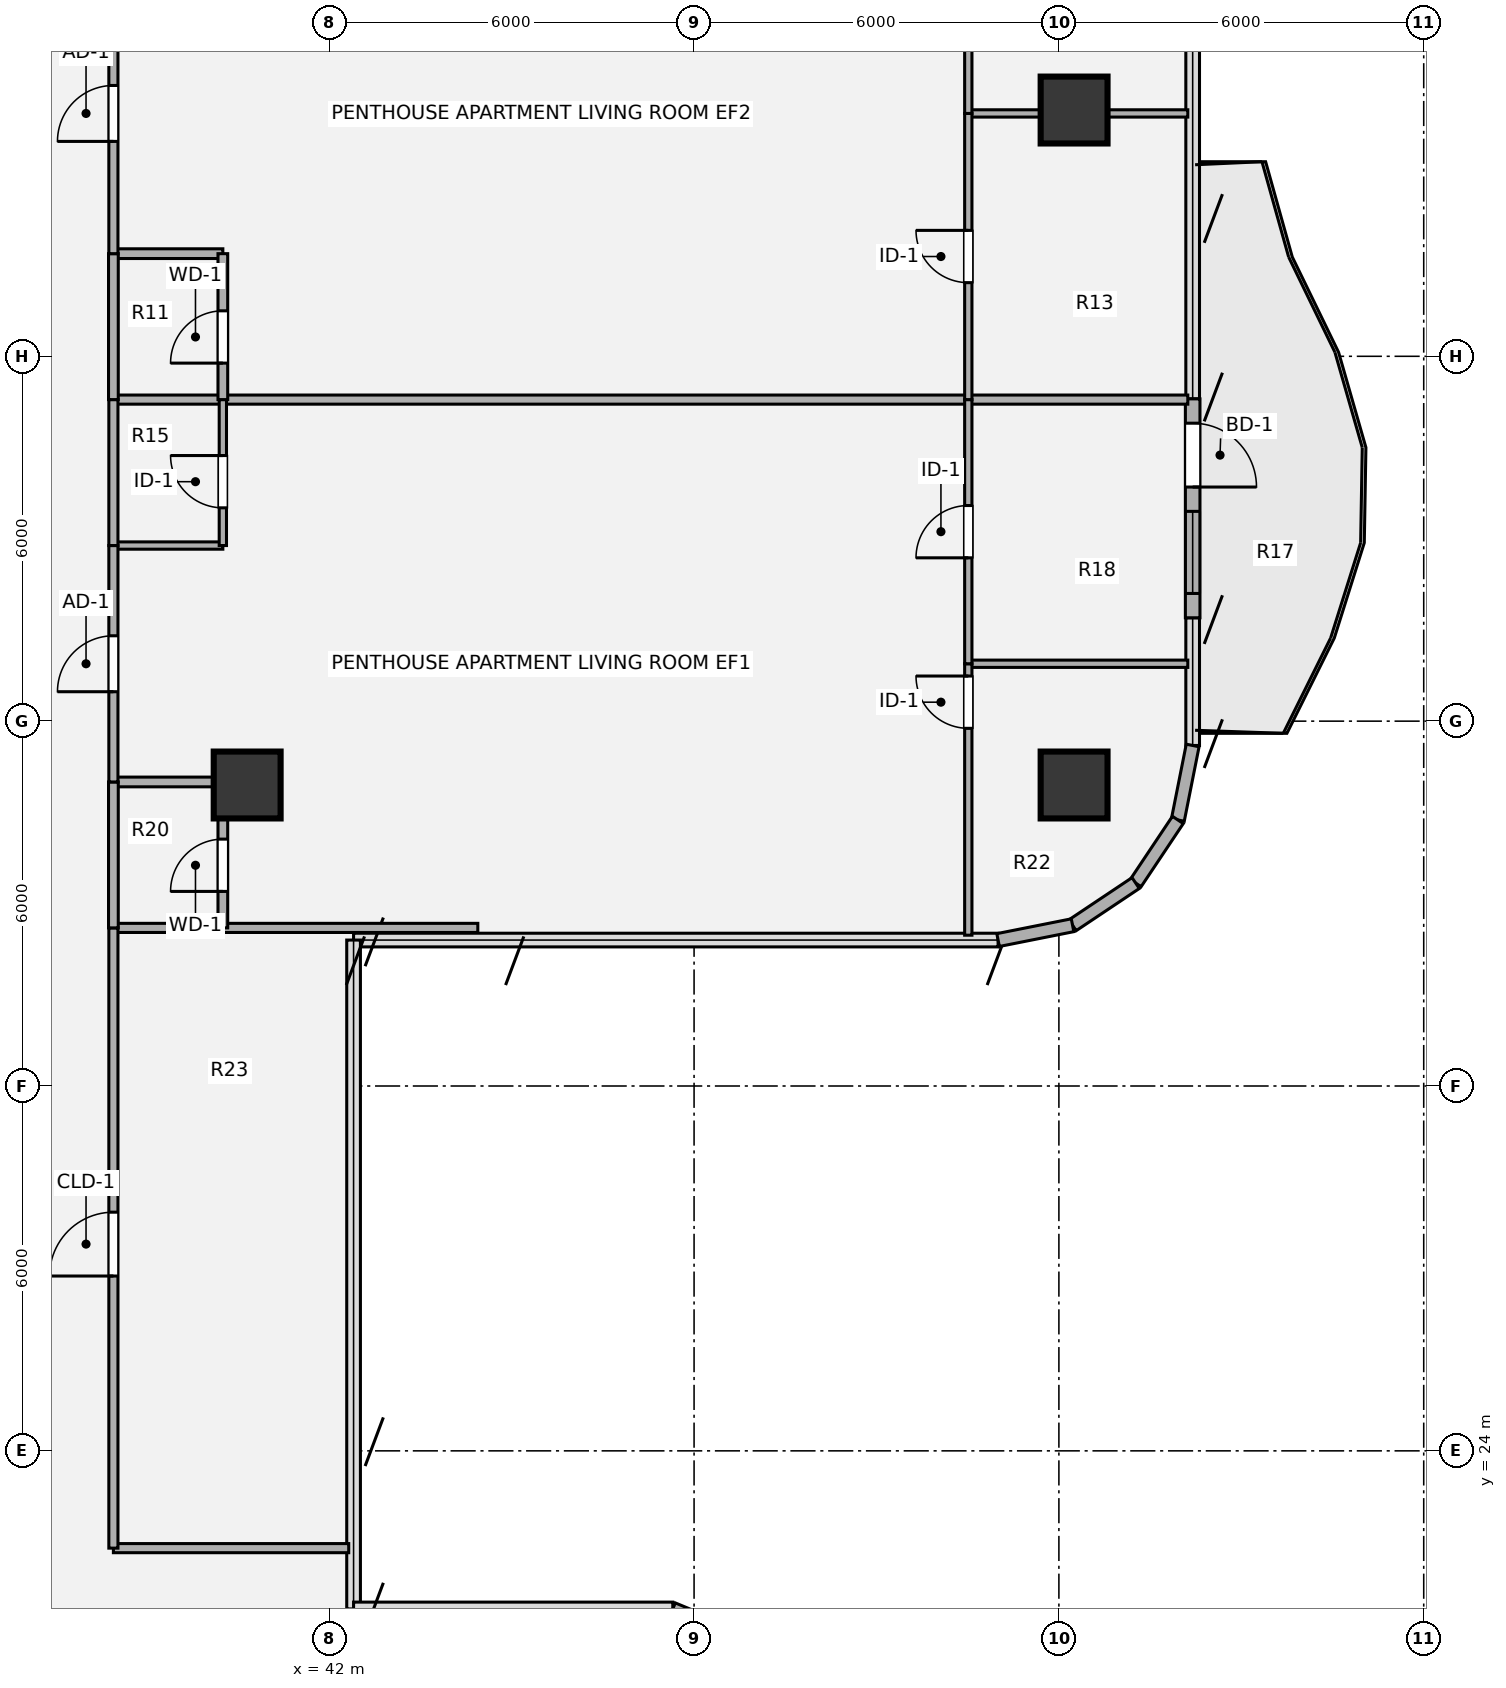
"""IFC4 building model, lengths in metres.
Left out: names, types, materials, properties, quantities, classifications, styles, units other than length and angle.
Written with IfcOpenShell. Run it as: python <this file> out.ifc"""

import sys

from ifc_helpers import new_model, si_unit, direction, frame, frame_2d, origin, origin_2d, place, context, subcontext, project, spatial, rectangle, hollow_circle, extrude, source, transform, mapped, element, fill, save


model = new_model("IFC4")
c1 = context("Model", 3, precision=1e-05, world=origin(), true_north=direction((0.0, 1.0)))
c2 = subcontext(c1, "Body", "Model", "MODEL_VIEW")
j1 = project(units=[si_unit("LENGTHUNIT", "METRE"), si_unit("PLANEANGLEUNIT", "RADIAN")], contexts=[c1])
p1 = place(None, origin())
s1 = spatial("IfcSite", under=j1, at=p1, CompositionType="ELEMENT")
p2 = place(p1, origin())
s2 = spatial("IfcBuilding", under=s1, at=p2, CompositionType="ELEMENT")
p3 = place(p2, frame((0.0, 0.0, 156.42)))
s3 = spatial("IfcBuildingStorey", under=s2, at=p3, CompositionType="ELEMENT", Elevation=156.42)
m1 = source(origin(), c2, "Body", "SweptSolid", [
    extrude(hollow_circle(Radius=0.55, WallThickness=0.04, at=origin_2d()), origin(), (0.0, 0.0, 1.0), 3.78),
])
for number, where, z_axis, x_axis in (
    (1, (54.25, 34.95, 0.0), (0.0, 0.0, 1.0), (1.0, 0.0, 0.0)),
    (2, (54.25, 46.05, 0.0), (0.0, 0.0, 1.0), (1.0, 0.0, 0.0)),
    (3, (40.65, 34.95, 0.0), (0.0, 0.0, 1.0), (1.0, 0.0, 0.0)),
):
    element("IfcColumn", number, at=place(p3, frame(where, z_axis=z_axis, x_axis=x_axis)), inside=s3, PredefinedType="COLUMN", context=c2, shape_type="MappedRepresentation", body=[
        mapped(m1, transform((0.0, 0.0, 0.0), x_axis=(1.0, 0.0, 0.0), y_axis=(0.0, 1.0, 0.0), z_axis=(0.0, 0.0, 1.0), scale=1.0)),
    ])
p4 = place(p3, frame((56.2, 41.3, 0.0), z_axis=(0.0, 0.0, 1.0), x_axis=(0.0, -1.0, 0.0)))
e4 = element("IfcWall", 4, at=p4, inside=s3, PredefinedType="SOLIDWALL", context=c2, shape_type="SweptSolid", body=[
    extrude(rectangle(XDim=3.6, YDim=0.24, at=frame_2d((1.8, 0.0))), origin(), (0.0, 0.0, 1.0), 3.53),
])
p5 = place(p4, frame((0.4, 0.0, 0.0)))
e5 = element("IfcOpeningElement", 5, at=p5, cuts=e4, PredefinedType="OPENING", context=c2, shape_type="SweptSolid", body=[
    extrude(rectangle(XDim=1.05, YDim=2.15, at=origin_2d()), frame((0.525, 0.13, 1.075), z_axis=(0.0, -1.0, 0.0), x_axis=(1.0, 0.0, 0.0)), (0.0, 0.0, 1.0), 0.26),
])
p6 = place(p4, frame((1.85, 0.0, 0.85)))
e6 = element("IfcOpeningElement", 6, at=p6, cuts=e4, PredefinedType="OPENING", context=c2, shape_type="SweptSolid", body=[
    extrude(rectangle(XDim=1.35, YDim=1.35, at=origin_2d()), frame((0.675, 0.13, 0.675), z_axis=(0.0, -1.0, 0.0), x_axis=(1.0, 0.0, 0.0)), (0.0, 0.0, 1.0), 0.26),
])
for number, where, z_axis, x_axis in (
    (7, (56.2, 35.6, 0.0), (0.0, 0.0, 1.0), (-0.195, -0.981, 0.0)),
    (8, (55.956, 34.375, 0.0), (0.0, 0.0, 1.0), (-0.556, -0.831, 0.0)),
    (9, (55.263, 33.337, 0.0), (0.0, 0.0, 1.0), (-0.831, -0.556, 0.0)),
    (10, (54.225, 32.644, 0.0), (0.0, 0.0, 1.0), (-0.981, -0.195, 0.0)),
):
    element("IfcWall", number, at=place(p3, frame(where, z_axis=z_axis, x_axis=x_axis)), inside=s3, PredefinedType="SOLIDWALL", context=c2, shape_type="SweptSolid", body=[
        extrude(rectangle(XDim=1.249, YDim=0.215, at=frame_2d((0.624, 0.0))), origin(), (0.0, 0.0, 1.0), 3.53),
    ])
p7 = place(p3, frame((47.65, 21.4, 0.0), z_axis=(0.0, 0.0, 1.0), x_axis=(0.924205486139, -0.381895560841, 0.0)))
e11 = element("IfcWall", 11, at=p7, inside=s3, PredefinedType="SOLIDWALL", context=c2, shape_type="SweptSolid", body=[
    extrude(rectangle(XDim=0.268, YDim=0.215, at=frame_2d((0.134, 0.0))), origin(), (0.0, 0.0, 1.0), 3.53),
])
p8 = place(p3, frame((38.45, 22.4, 0.0), z_axis=(0.0, 0.0, 1.0), x_axis=(1.0, 0.0, 0.0)))
e12 = element("IfcWall", 12, at=p8, inside=s3, PredefinedType="PARTITIONING", context=c2, shape_type="SweptSolid", body=[
    extrude(rectangle(XDim=3.87, YDim=0.15, at=frame_2d((1.935, 0.0))), origin(), (0.0, 0.0, 1.0), 3.5),
])
p9 = place(p3, frame((38.45, 32.6, 0.0), z_axis=(0.0, 0.0, 1.0), x_axis=(1.0, 0.0, 0.0)))
e13 = element("IfcWall", 13, at=p9, inside=s3, PredefinedType="PARTITIONING", context=c2, shape_type="SweptSolid", body=[
    extrude(rectangle(XDim=5.993, YDim=0.15, at=frame_2d((2.997, 0.0))), origin(), (0.0, 0.0, 1.0), 3.5),
])
p10 = place(p3, frame((38.45, 35.0, 0.0), z_axis=(0.0, 0.0, 1.0), x_axis=(1.0, 0.0, 0.0)))
e14 = element("IfcWall", 14, at=p10, inside=s3, PredefinedType="PLUMBINGWALL", context=c2, shape_type="SweptSolid", body=[
    extrude(rectangle(XDim=1.8, YDim=0.16, at=frame_2d((0.9, 0.0))), origin(), (0.0, 0.0, 1.0), 2.903),
])
p11 = place(p3, frame((52.51, 36.944, 0.0), z_axis=(0.0, 0.0, 1.0), x_axis=(1.0, 0.0, 0.0)))
e15 = element("IfcWall", 15, at=p11, inside=s3, PredefinedType="PARTITIONING", context=c2, shape_type="SweptSolid", body=[
    extrude(rectangle(XDim=3.61, YDim=0.12, at=frame_2d((1.805, 0.0))), origin(), (0.0, 0.0, 1.0), 2.982),
])
p12 = place(p3, frame((38.45, 38.888, 0.0), z_axis=(0.0, 0.0, 1.0), x_axis=(1.0, 0.0, 0.0)))
e16 = element("IfcWall", 16, at=p12, inside=s3, PredefinedType="PARTITIONING", context=c2, shape_type="SweptSolid", body=[
    extrude(rectangle(XDim=1.8, YDim=0.12, at=frame_2d((0.9, 0.0))), origin(), (0.0, 0.0, 1.0), 3.259),
])
p13 = place(p3, frame((38.45, 41.288, 0.0), z_axis=(0.0, 0.0, 1.0), x_axis=(1.0, 0.0, 0.0)))
e17 = element("IfcWall", 17, at=p13, inside=s3, PredefinedType="PARTITIONING", context=c2, shape_type="SweptSolid", body=[
    extrude(rectangle(XDim=17.67, YDim=0.15, at=frame_2d((8.835, 0.0))), origin(), (0.0, 0.0, 1.0), 2.982),
])
p14 = place(p3, frame((38.45, 43.688, 0.0), z_axis=(0.0, 0.0, 1.0), x_axis=(1.0, 0.0, 0.0)))
e18 = element("IfcWall", 18, at=p14, inside=s3, PredefinedType="PLUMBINGWALL", context=c2, shape_type="SweptSolid", body=[
    extrude(rectangle(XDim=1.8, YDim=0.16, at=frame_2d((0.9, 0.0))), origin(), (0.0, 0.0, 1.0), 3.259),
])
p15 = place(p3, frame((52.51, 45.994, 0.0), z_axis=(0.0, 0.0, 1.0), x_axis=(1.0, 0.0, 0.0)))
e19 = element("IfcWall", 19, at=p15, inside=s3, PredefinedType="PARTITIONING", context=c2, shape_type="SweptSolid", body=[
    extrude(rectangle(XDim=3.61, YDim=0.12, at=frame_2d((1.805, 0.0))), origin(), (0.0, 0.0, 1.0), 2.903),
])
p16 = place(p3, frame((38.45, 22.4, 0.0), z_axis=(0.0, 0.0, 1.0), x_axis=(0.0, 1.0, 0.0)))
e20 = element("IfcWall", 20, at=p16, inside=s3, PredefinedType="PARTITIONING", context=c2, shape_type="SweptSolid", body=[
    extrude(rectangle(XDim=10.2, YDim=0.15, at=frame_2d((5.1, 0.0))), origin(), (0.0, 0.0, 1.0), 3.5),
])
p17 = place(p16, frame((4.475, 0.0, 0.0)))
e21 = element("IfcOpeningElement", 21, at=p17, cuts=e20, PredefinedType="OPENING", context=c2, shape_type="SweptSolid", body=[
    extrude(rectangle(XDim=1.05, YDim=2.1, at=origin_2d()), frame((0.525, 0.085, 1.05), z_axis=(0.0, -1.0, 0.0), x_axis=(1.0, 0.0, 0.0)), (0.0, 0.0, 1.0), 0.17),
])
p18 = place(p3, frame((38.45, 32.6, 0.0), z_axis=(0.0, 0.0, 1.0), x_axis=(0.0, 1.0, 0.0)))
e22 = element("IfcWall", 22, at=p18, inside=s3, PredefinedType="PLUMBINGWALL", context=c2, shape_type="SweptSolid", body=[
    extrude(rectangle(XDim=2.4, YDim=0.16, at=frame_2d((1.2, 0.0))), origin(), (0.0, 0.0, 1.0), 3.5),
])
p19 = place(p3, frame((38.45, 35.0, 0.0), z_axis=(0.0, 0.0, 1.0), x_axis=(0.0, 1.0, 0.0)))
e23 = element("IfcWall", 23, at=p19, inside=s3, PredefinedType="PARTITIONING", context=c2, shape_type="SweptSolid", body=[
    extrude(rectangle(XDim=3.888, YDim=0.15, at=frame_2d((1.944, 0.0))), origin(), (0.0, 0.0, 1.0), 3.5),
])
p20 = place(p19, frame((1.484, 0.0, 0.0)))
e24 = element("IfcOpeningElement", 24, at=p20, cuts=e23, PredefinedType="OPENING", context=c2, shape_type="SweptSolid", body=[
    extrude(rectangle(XDim=0.92, YDim=2.1, at=origin_2d()), frame((0.46, 0.085, 1.05), z_axis=(0.0, -1.0, 0.0), x_axis=(1.0, 0.0, 0.0)), (0.0, 0.0, 1.0), 0.17),
])
p21 = place(p3, frame((38.45, 38.888, 0.0), z_axis=(0.0, 0.0, 1.0), x_axis=(0.0, 1.0, 0.0)))
e25 = element("IfcWall", 25, at=p21, inside=s3, PredefinedType="PARTITIONING", context=c2, shape_type="SweptSolid", body=[
    extrude(rectangle(XDim=2.4, YDim=0.15, at=frame_2d((1.2, 0.0))), origin(), (0.0, 0.0, 1.0), 3.5),
])
p22 = place(p3, frame((38.45, 41.288, 0.0), z_axis=(0.0, 0.0, 1.0), x_axis=(0.0, 1.0, 0.0)))
e26 = element("IfcWall", 26, at=p22, inside=s3, PredefinedType="PLUMBINGWALL", context=c2, shape_type="SweptSolid", body=[
    extrude(rectangle(XDim=2.4, YDim=0.16, at=frame_2d((1.2, 0.0))), origin(), (0.0, 0.0, 1.0), 3.5),
])
p23 = place(p3, frame((38.45, 43.688, 0.0), z_axis=(0.0, 0.0, 1.0), x_axis=(0.0, 1.0, 0.0)))
e27 = element("IfcWall", 27, at=p23, inside=s3, PredefinedType="PARTITIONING", context=c2, shape_type="SweptSolid", body=[
    extrude(rectangle(XDim=4.612, YDim=0.15, at=frame_2d((2.306, 0.0))), origin(), (0.0, 0.0, 1.0), 3.5),
])
p24 = place(p23, frame((1.846, 0.0, 0.0)))
e28 = element("IfcOpeningElement", 28, at=p24, cuts=e27, PredefinedType="OPENING", context=c2, shape_type="SweptSolid", body=[
    extrude(rectangle(XDim=0.92, YDim=2.1, at=origin_2d()), frame((0.46, 0.085, 1.05), z_axis=(0.0, -1.0, 0.0), x_axis=(1.0, 0.0, 0.0)), (0.0, 0.0, 1.0), 0.17),
])
p25 = place(p3, frame((40.25, 32.6, 0.0), z_axis=(0.0, 0.0, 1.0), x_axis=(0.0, 1.0, 0.0)))
e29 = element("IfcWall", 29, at=p25, inside=s3, PredefinedType="PLUMBINGWALL", context=c2, shape_type="SweptSolid", body=[
    extrude(rectangle(XDim=2.4, YDim=0.16, at=frame_2d((1.2, 0.0))), origin(), (0.0, 0.0, 1.0), 3.5),
])
p26 = place(p25, frame((0.6, 0.0, 0.0)))
e30 = element("IfcOpeningElement", 30, at=p26, cuts=e29, PredefinedType="OPENING", context=c2, shape_type="SweptSolid", body=[
    extrude(rectangle(XDim=0.86, YDim=2.1, at=origin_2d()), frame((0.43, 0.09, 1.05), z_axis=(0.0, -1.0, 0.0), x_axis=(1.0, 0.0, 0.0)), (0.0, 0.0, 1.0), 0.18),
])
p27 = place(p3, frame((40.25, 38.888, 0.0), z_axis=(0.0, 0.0, 1.0), x_axis=(0.0, 1.0, 0.0)))
e31 = element("IfcWall", 31, at=p27, inside=s3, PredefinedType="PARTITIONING", context=c2, shape_type="SweptSolid", body=[
    extrude(rectangle(XDim=2.4, YDim=0.12, at=frame_2d((1.2, 0.0))), origin(), (0.0, 0.0, 1.0), 3.5),
])
p28 = place(p27, frame((0.62, 0.0, 0.0)))
e32 = element("IfcOpeningElement", 32, at=p28, cuts=e31, PredefinedType="OPENING", context=c2, shape_type="SweptSolid", body=[
    extrude(rectangle(XDim=0.86, YDim=2.1, at=origin_2d()), frame((0.43, 0.07, 1.05), z_axis=(0.0, -1.0, 0.0), x_axis=(1.0, 0.0, 0.0)), (0.0, 0.0, 1.0), 0.14),
])
p29 = place(p3, frame((40.25, 41.288, 0.0), z_axis=(0.0, 0.0, 1.0), x_axis=(0.0, 1.0, 0.0)))
e33 = element("IfcWall", 33, at=p29, inside=s3, PredefinedType="PLUMBINGWALL", context=c2, shape_type="SweptSolid", body=[
    extrude(rectangle(XDim=2.4, YDim=0.16, at=frame_2d((1.2, 0.0))), origin(), (0.0, 0.0, 1.0), 3.5),
])
p30 = place(p29, frame((0.6, 0.0, 0.0)))
e34 = element("IfcOpeningElement", 34, at=p30, cuts=e33, PredefinedType="OPENING", context=c2, shape_type="SweptSolid", body=[
    extrude(rectangle(XDim=0.86, YDim=2.1, at=origin_2d()), frame((0.43, 0.09, 1.05), z_axis=(0.0, -1.0, 0.0), x_axis=(1.0, 0.0, 0.0)), (0.0, 0.0, 1.0), 0.18),
])
p31 = place(p3, frame((52.51, 32.48, 0.0), z_axis=(0.0, 0.0, 1.0), x_axis=(0.0, 1.0, 0.0)))
e35 = element("IfcWall", 35, at=p31, inside=s3, PredefinedType="PARTITIONING", context=c2, shape_type="SweptSolid", body=[
    extrude(rectangle(XDim=4.464, YDim=0.12, at=frame_2d((2.232, 0.0))), origin(), (0.0, 0.0, 1.0), 3.5),
])
p32 = place(p31, frame((3.402, 0.0, 0.0)))
e36 = element("IfcOpeningElement", 36, at=p32, cuts=e35, PredefinedType="OPENING", context=c2, shape_type="SweptSolid", body=[
    extrude(rectangle(XDim=0.86, YDim=2.1, at=origin_2d()), frame((0.43, 0.07, 1.05), z_axis=(0.0, -1.0, 0.0), x_axis=(1.0, 0.0, 0.0)), (0.0, 0.0, 1.0), 0.14),
])
p33 = place(p3, frame((52.51, 36.944, 0.0), z_axis=(0.0, 0.0, 1.0), x_axis=(0.0, 1.0, 0.0)))
e37 = element("IfcWall", 37, at=p33, inside=s3, PredefinedType="PARTITIONING", context=c2, shape_type="SweptSolid", body=[
    extrude(rectangle(XDim=4.344, YDim=0.12, at=frame_2d((2.172, 0.0))), origin(), (0.0, 0.0, 1.0), 3.5),
])
p34 = place(p33, frame((1.742, 0.0, 0.0)))
e38 = element("IfcOpeningElement", 38, at=p34, cuts=e37, PredefinedType="OPENING", context=c2, shape_type="SweptSolid", body=[
    extrude(rectangle(XDim=0.86, YDim=2.1, at=origin_2d()), frame((0.43, 0.07, 1.05), z_axis=(0.0, -1.0, 0.0), x_axis=(1.0, 0.0, 0.0)), (0.0, 0.0, 1.0), 0.14),
])
p35 = place(p3, frame((52.51, 41.288, 0.0), z_axis=(0.0, 0.0, 1.0), x_axis=(0.0, 1.0, 0.0)))
e39 = element("IfcWall", 39, at=p35, inside=s3, PredefinedType="PARTITIONING", context=c2, shape_type="SweptSolid", body=[
    extrude(rectangle(XDim=4.706, YDim=0.12, at=frame_2d((2.353, 0.0))), origin(), (0.0, 0.0, 1.0), 3.5),
])
p36 = place(p35, frame((1.923, 0.0, 0.0)))
e40 = element("IfcOpeningElement", 40, at=p36, cuts=e39, PredefinedType="OPENING", context=c2, shape_type="SweptSolid", body=[
    extrude(rectangle(XDim=0.86, YDim=2.1, at=origin_2d()), frame((0.43, 0.07, 1.05), z_axis=(0.0, -1.0, 0.0), x_axis=(1.0, 0.0, 0.0)), (0.0, 0.0, 1.0), 0.14),
])
p37 = place(p3, frame((52.51, 45.994, 0.0), z_axis=(0.0, 0.0, 1.0), x_axis=(0.0, 1.0, 0.0)))
e41 = element("IfcWall", 41, at=p37, inside=s3, PredefinedType="PARTITIONING", context=c2, shape_type="SweptSolid", body=[
    extrude(rectangle(XDim=4.706, YDim=0.12, at=frame_2d((2.353, 0.0))), origin(), (0.0, 0.0, 1.0), 3.5),
])
p38 = place(p37, frame((1.923, 0.0, 0.0)))
e42 = element("IfcOpeningElement", 42, at=p38, cuts=e41, PredefinedType="OPENING", context=c2, shape_type="SweptSolid", body=[
    extrude(rectangle(XDim=0.86, YDim=2.1, at=origin_2d()), frame((0.43, 0.07, 1.05), z_axis=(0.0, -1.0, 0.0), x_axis=(1.0, 0.0, 0.0)), (0.0, 0.0, 1.0), 0.14),
])
m2 = source(origin(), c2, "Body", "SweptSolid", [
    extrude(rectangle(XDim=1.05, YDim=2.15, at=origin_2d()), frame((0.525, 0.025, 1.075), z_axis=(0.0, -1.0, 0.0), x_axis=(1.0, 0.0, 0.0)), (0.0, 0.0, 1.0), 0.05),
])
p39 = place(p5, origin())
e43 = element("IfcDoor", 43, at=p39, inside=s3, OperationType="SINGLE_SWING_RIGHT", PredefinedType="DOOR", context=c2, shape_type="MappedRepresentation", body=[
    mapped(m2, transform((0.0, 0.0, 0.0), x_axis=(1.0, 0.0, 0.0), y_axis=(0.0, 1.0, 0.0), z_axis=(0.0, 0.0, 1.0), scale=1.0)),
])
fill(e5, e43)
m3 = source(origin(), c2, "Body", "SweptSolid", [
    extrude(rectangle(XDim=1.35, YDim=1.35, at=origin_2d()), frame((0.675, 0.03, 0.675), z_axis=(0.0, -1.0, 0.0), x_axis=(1.0, 0.0, 0.0)), (0.0, 0.0, 1.0), 0.06),
])
p40 = place(p6, origin())
e44 = element("IfcWindow", 44, at=p40, inside=s3, PartitioningType="SINGLE_PANEL", PredefinedType="WINDOW", context=c2, shape_type="MappedRepresentation", body=[
    mapped(m3, transform((0.0, 0.0, 0.0), x_axis=(1.0, 0.0, 0.0), y_axis=(0.0, 1.0, 0.0), z_axis=(0.0, 0.0, 1.0), scale=1.0)),
])
fill(e6, e44)
m4 = source(origin(), c2, "Body", "SweptSolid", [
    extrude(rectangle(XDim=1.05, YDim=2.1, at=origin_2d()), frame((0.525, 0.025, 1.05), z_axis=(0.0, -1.0, 0.0), x_axis=(1.0, 0.0, 0.0)), (0.0, 0.0, 1.0), 0.05),
])
p41 = place(p17, origin())
e45 = element("IfcDoor", 45, at=p41, inside=s3, OperationType="SINGLE_SWING_LEFT", PredefinedType="DOOR", context=c2, shape_type="MappedRepresentation", body=[
    mapped(m4, transform((0.0, 0.0, 0.0), x_axis=(1.0, 0.0, 0.0), y_axis=(0.0, 1.0, 0.0), z_axis=(0.0, 0.0, 1.0), scale=1.0)),
])
fill(e21, e45)
m5 = source(origin(), c2, "Body", "SweptSolid", [
    extrude(rectangle(XDim=0.92, YDim=2.1, at=origin_2d()), frame((0.46, 0.025, 1.05), z_axis=(0.0, -1.0, 0.0), x_axis=(1.0, 0.0, 0.0)), (0.0, 0.0, 1.0), 0.05),
])
p42 = place(p20, origin())
e46 = element("IfcDoor", 46, at=p42, inside=s3, OperationType="SINGLE_SWING_LEFT", PredefinedType="DOOR", context=c2, shape_type="MappedRepresentation", body=[
    mapped(m5, transform((0.0, 0.0, 0.0), x_axis=(1.0, 0.0, 0.0), y_axis=(0.0, 1.0, 0.0), z_axis=(0.0, 0.0, 1.0), scale=1.0)),
])
fill(e24, e46)
p43 = place(p24, origin())
e47 = element("IfcDoor", 47, at=p43, inside=s3, OperationType="SINGLE_SWING_LEFT", PredefinedType="DOOR", context=c2, shape_type="MappedRepresentation", body=[
    mapped(m5, transform((0.0, 0.0, 0.0), x_axis=(1.0, 0.0, 0.0), y_axis=(0.0, 1.0, 0.0), z_axis=(0.0, 0.0, 1.0), scale=1.0)),
])
fill(e28, e47)
m6 = source(origin(), c2, "Body", "SweptSolid", [
    extrude(rectangle(XDim=0.86, YDim=2.1, at=origin_2d()), frame((0.43, 0.025, 1.05), z_axis=(0.0, -1.0, 0.0), x_axis=(1.0, 0.0, 0.0)), (0.0, 0.0, 1.0), 0.05),
])
p44 = place(p26, origin())
e48 = element("IfcDoor", 48, at=p44, inside=s3, OperationType="SINGLE_SWING_LEFT", PredefinedType="DOOR", context=c2, shape_type="MappedRepresentation", body=[
    mapped(m6, transform((0.0, 0.0, 0.0), x_axis=(1.0, 0.0, 0.0), y_axis=(0.0, 1.0, 0.0), z_axis=(0.0, 0.0, 1.0), scale=1.0)),
])
fill(e30, e48)
m7 = source(origin(), c2, "Body", "SweptSolid", [
    extrude(rectangle(XDim=0.86, YDim=2.1, at=origin_2d()), frame((0.43, 0.025, 1.05), z_axis=(0.0, -1.0, 0.0), x_axis=(1.0, 0.0, 0.0)), (0.0, 0.0, 1.0), 0.05),
])
p45 = place(p28, origin())
e49 = element("IfcDoor", 49, at=p45, inside=s3, OperationType="SINGLE_SWING_RIGHT", PredefinedType="DOOR", context=c2, shape_type="MappedRepresentation", body=[
    mapped(m7, transform((0.0, 0.0, 0.0), x_axis=(1.0, 0.0, 0.0), y_axis=(0.0, 1.0, 0.0), z_axis=(0.0, 0.0, 1.0), scale=1.0)),
])
fill(e32, e49)
p46 = place(p30, origin())
e50 = element("IfcDoor", 50, at=p46, inside=s3, OperationType="SINGLE_SWING_LEFT", PredefinedType="DOOR", context=c2, shape_type="MappedRepresentation", body=[
    mapped(m6, transform((0.0, 0.0, 0.0), x_axis=(1.0, 0.0, 0.0), y_axis=(0.0, 1.0, 0.0), z_axis=(0.0, 0.0, 1.0), scale=1.0)),
])
fill(e34, e50)
p47 = place(p32, origin())
e51 = element("IfcDoor", 51, at=p47, inside=s3, OperationType="SINGLE_SWING_RIGHT", PredefinedType="DOOR", context=c2, shape_type="MappedRepresentation", body=[
    mapped(m7, transform((0.0, 0.0, 0.0), x_axis=(1.0, 0.0, 0.0), y_axis=(0.0, 1.0, 0.0), z_axis=(0.0, 0.0, 1.0), scale=1.0)),
])
fill(e36, e51)
p48 = place(p34, origin())
e52 = element("IfcDoor", 52, at=p48, inside=s3, OperationType="SINGLE_SWING_LEFT", PredefinedType="DOOR", context=c2, shape_type="MappedRepresentation", body=[
    mapped(m7, transform((0.0, 0.0, 0.0), x_axis=(1.0, 0.0, 0.0), y_axis=(0.0, 1.0, 0.0), z_axis=(0.0, 0.0, 1.0), scale=1.0)),
])
fill(e38, e52)
p49 = place(p36, origin())
e53 = element("IfcDoor", 53, at=p49, inside=s3, OperationType="SINGLE_SWING_RIGHT", PredefinedType="DOOR", context=c2, shape_type="MappedRepresentation", body=[
    mapped(m7, transform((0.0, 0.0, 0.0), x_axis=(1.0, 0.0, 0.0), y_axis=(0.0, 1.0, 0.0), z_axis=(0.0, 0.0, 1.0), scale=1.0)),
])
fill(e40, e53)
save(model, sys.argv[1])
